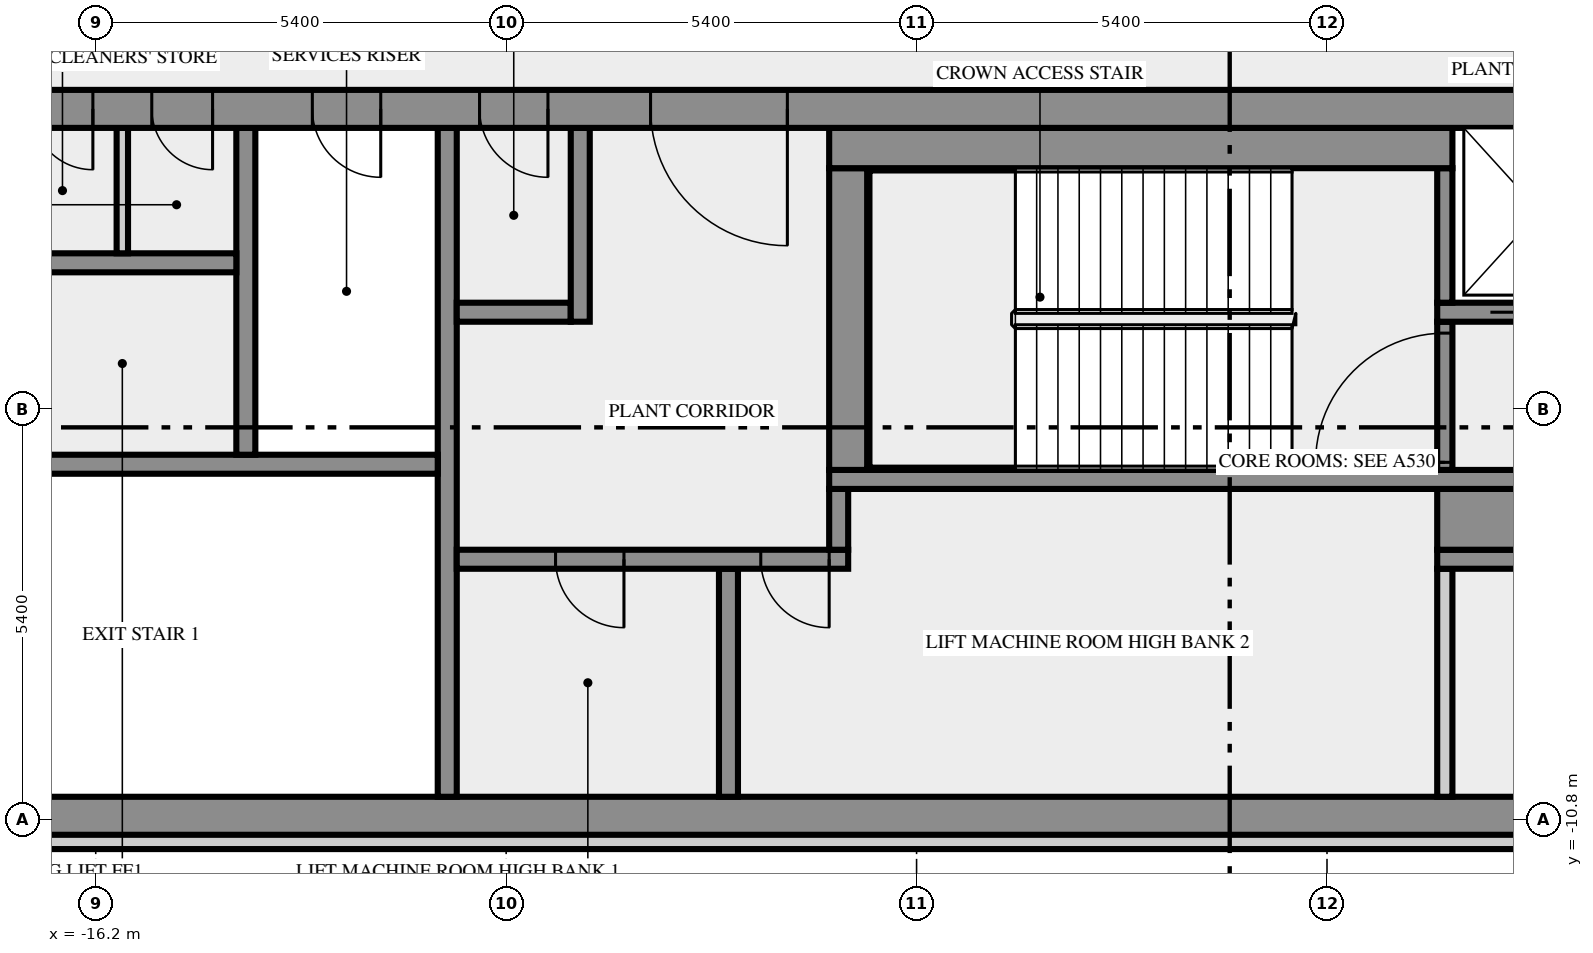
"""IFC4 building model, lengths in metres.
Left out: names, types, materials, properties, quantities, classifications, styles, units other than length and angle.
Written with IfcOpenShell. Run it as: python <this file> out.ifc"""

import sys

from ifc_helpers import new_model, si_unit, direction, frame, frame_2d, origin, place, context, subcontext, project, spatial, rectangle, extrude, element, fill, save


model = new_model("IFC4")
c1 = context("Model", 3, precision=1e-05, world=origin(), true_north=direction((0.0, 1.0)))
c2 = subcontext(c1, "Body", "Model", "MODEL_VIEW")
j1 = project(units=[si_unit("LENGTHUNIT", "METRE"), si_unit("PLANEANGLEUNIT", "RADIAN")], contexts=[c1])
p1 = place(None, origin())
s1 = spatial("IfcSite", under=j1, at=p1, CompositionType="ELEMENT")
p2 = place(p1, origin())
s2 = spatial("IfcBuilding", under=s1, at=p2, CompositionType="ELEMENT")
p3 = place(p2, frame((0.0, 0.0, 363.0)))
s3 = spatial("IfcBuildingStorey", under=s2, at=p3, CompositionType="ELEMENT", Elevation=363.0)
p4 = place(p3, frame((-14.748, 10.692, 0.0), z_axis=(0.0, 0.0, 1.0), x_axis=(-0.453989383659, -0.891007092859, 0.0)))
e1 = element("IfcWall", 1, at=p4, inside=s3, PredefinedType="SOLIDWALL", context=c2, shape_type="SweptSolid", body=[
    extrude(rectangle(XDim=20.988, YDim=0.2, at=frame_2d((10.494, 0.0))), origin(), (0.0, 0.0, 1.0), 4.75),
])
p5 = place(p4, frame((1.06, 0.0, 1.0)))
e2 = element("IfcOpeningElement", 2, at=p5, cuts=e1, PredefinedType="OPENING", context=c2, shape_type="SweptSolid", body=[
    extrude(rectangle(XDim=3.0, YDim=2.8, at=frame_2d((1.5, 1.4))), frame((0.0, 0.11, 0.0), z_axis=(0.0, -1.0, 0.0), x_axis=(1.0, 0.0, 0.0)), (0.0, 0.0, 1.0), 0.22),
])
p6 = place(p4, frame((6.428, 0.0, 1.0)))
e3 = element("IfcOpeningElement", 3, at=p6, cuts=e1, PredefinedType="OPENING", context=c2, shape_type="SweptSolid", body=[
    extrude(rectangle(XDim=3.0, YDim=2.8, at=frame_2d((1.5, 1.4))), frame((0.0, 0.11, 0.0), z_axis=(0.0, -1.0, 0.0), x_axis=(1.0, 0.0, 0.0)), (0.0, 0.0, 1.0), 0.22),
])
p7 = place(p4, frame((12.044, 0.0, 1.0)))
e4 = element("IfcOpeningElement", 4, at=p7, cuts=e1, PredefinedType="OPENING", context=c2, shape_type="SweptSolid", body=[
    extrude(rectangle(XDim=3.0, YDim=2.8, at=frame_2d((1.5, 1.4))), frame((0.0, 0.11, 0.0), z_axis=(0.0, -1.0, 0.0), x_axis=(1.0, 0.0, 0.0)), (0.0, 0.0, 1.0), 0.22),
])
p8 = place(p4, frame((17.17, 0.0, 1.0)))
e5 = element("IfcOpeningElement", 5, at=p8, cuts=e1, PredefinedType="OPENING", context=c2, shape_type="SweptSolid", body=[
    extrude(rectangle(XDim=3.0, YDim=2.8, at=frame_2d((1.5, 1.4))), frame((0.0, 0.11, 0.0), z_axis=(0.0, -1.0, 0.0), x_axis=(1.0, 0.0, 0.0)), (0.0, 0.0, 1.0), 0.22),
])
p9 = place(p3, frame((-17.444, -11.088, 0.0), z_axis=(0.0, 0.0, 1.0), x_axis=(1.0, 0.0, 0.0)))
e6 = element("IfcWall", 6, at=p9, inside=s3, PredefinedType="SOLIDWALL", context=c2, shape_type="SweptSolid", body=[
    extrude(rectangle(XDim=34.888, YDim=0.2, at=frame_2d((17.444, 0.0))), origin(), (0.0, 0.0, 1.0), 4.75),
])
p10 = place(p3, frame((-20.0, -10.75, 0.0), z_axis=(0.0, 0.0, 1.0), x_axis=(1.0, 0.0, 0.0)))
e7 = element("IfcWall", 7, at=p10, inside=s3, PredefinedType="SHEAR", context=c2, shape_type="SweptSolid", body=[
    extrude(rectangle(XDim=40.0, YDim=0.5, at=frame_2d((20.0, 0.0))), origin(), (0.0, 0.0, 1.0), 4.75),
])
p11 = place(p10, frame((0.8, 0.0, 1.0)))
e8 = element("IfcOpeningElement", 8, at=p11, cuts=e7, PredefinedType="OPENING", context=c2, shape_type="SweptSolid", body=[
    extrude(rectangle(XDim=1.2, YDim=1.2, at=frame_2d((0.6, 0.6))), frame((0.0, 0.26, 0.0), z_axis=(0.0, -1.0, 0.0), x_axis=(1.0, 0.0, 0.0)), (0.0, 0.0, 1.0), 0.52),
])
p12 = place(p10, frame((38.0, 0.0, 1.0)))
e9 = element("IfcOpeningElement", 9, at=p12, cuts=e7, PredefinedType="OPENING", context=c2, shape_type="SweptSolid", body=[
    extrude(rectangle(XDim=1.2, YDim=1.2, at=frame_2d((0.6, 0.6))), frame((0.0, 0.26, 0.0), z_axis=(0.0, -1.0, 0.0), x_axis=(1.0, 0.0, 0.0)), (0.0, 0.0, 1.0), 0.52),
])
p13 = place(p3, frame((-11.575, -10.5, 0.0), z_axis=(0.0, 0.0, 1.0), x_axis=(0.0, 1.0, 0.0)))
e10 = element("IfcWall", 10, at=p13, inside=s3, PredefinedType="SHEAR", context=c2, shape_type="SweptSolid", body=[
    extrude(rectangle(XDim=8.8, YDim=0.25, at=frame_2d((4.4, 0.0))), origin(), (0.0, 0.0, 1.0), 4.75),
])
p14 = place(p3, frame((-7.875, -10.5, 0.0), z_axis=(0.0, 0.0, 1.0), x_axis=(0.0, 1.0, 0.0)))
e11 = element("IfcWall", 11, at=p14, inside=s3, PredefinedType="SHEAR", context=c2, shape_type="SweptSolid", body=[
    extrude(rectangle(XDim=3.0, YDim=0.25, at=frame_2d((1.5, 0.0))), origin(), (0.0, 0.0, 1.0), 4.75),
])
p15 = place(p3, frame((1.55, -10.5, 0.0), z_axis=(0.0, 0.0, 1.0), x_axis=(0.0, 1.0, 0.0)))
e12 = element("IfcWall", 12, at=p15, inside=s3, PredefinedType="SOLIDWALL", context=c2, shape_type="SweptSolid", body=[
    extrude(rectangle(XDim=3.0, YDim=0.2, at=frame_2d((1.5, 0.0))), origin(), (0.0, 0.0, 1.0), 4.75),
])
p16 = place(p3, frame((-6.3, -7.375, 0.0), z_axis=(0.0, 0.0, 1.0), x_axis=(-1.0, 0.0, 0.0)))
e13 = element("IfcWall", 13, at=p16, inside=s3, PredefinedType="SHEAR", context=c2, shape_type="SweptSolid", body=[
    extrude(rectangle(XDim=5.15, YDim=0.25, at=frame_2d((2.575, 0.0))), origin(), (0.0, 0.0, 1.0), 4.75),
])
p17 = place(p16, frame((2.95, 0.0, 0.0)))
e14 = element("IfcOpeningElement", 14, at=p17, cuts=e13, PredefinedType="OPENING", context=c2, shape_type="SweptSolid", body=[
    extrude(rectangle(XDim=0.9, YDim=2.1, at=frame_2d((0.45, 1.05))), frame((0.0, 0.135, 0.0), z_axis=(0.0, -1.0, 0.0), x_axis=(1.0, 0.0, 0.0)), (0.0, 0.0, 1.0), 0.27),
])
p18 = place(p16, frame((0.25, 0.0, 0.0)))
e15 = element("IfcOpeningElement", 15, at=p18, cuts=e13, PredefinedType="OPENING", context=c2, shape_type="SweptSolid", body=[
    extrude(rectangle(XDim=0.9, YDim=2.1, at=frame_2d((0.45, 1.05))), frame((0.0, 0.135, 0.0), z_axis=(0.0, -1.0, 0.0), x_axis=(1.0, 0.0, 0.0)), (0.0, 0.0, 1.0), 0.27),
])
p19 = place(p3, frame((11.7, -7.375, 0.0), z_axis=(0.0, 0.0, 1.0), x_axis=(-1.0, 0.0, 0.0)))
e16 = element("IfcWall", 16, at=p19, inside=s3, PredefinedType="SHEAR", context=c2, shape_type="SweptSolid", body=[
    extrude(rectangle(XDim=10.25, YDim=0.25, at=frame_2d((5.125, 0.0))), origin(), (0.0, 0.0, 1.0), 4.75),
])
p20 = place(p19, frame((3.25, 0.0, 0.0)))
e17 = element("IfcOpeningElement", 17, at=p20, cuts=e16, PredefinedType="OPENING", context=c2, shape_type="SweptSolid", body=[
    extrude(rectangle(XDim=0.9, YDim=2.1, at=frame_2d((0.45, 1.05))), frame((0.0, 0.135, 0.0), z_axis=(0.0, -1.0, 0.0), x_axis=(1.0, 0.0, 0.0)), (0.0, 0.0, 1.0), 0.27),
])
p21 = place(p3, frame((-6.425, -7.25, 0.0), z_axis=(0.0, 0.0, 1.0), x_axis=(0.0, 1.0, 0.0)))
e18 = element("IfcWall", 18, at=p21, inside=s3, PredefinedType="SHEAR", context=c2, shape_type="SweptSolid", body=[
    extrude(rectangle(XDim=0.8, YDim=0.25, at=frame_2d((0.4, 0.0))), origin(), (0.0, 0.0, 1.0), 4.75),
])
p22 = place(p3, frame((1.45, -6.85, 0.0), z_axis=(0.0, 0.0, 1.0), x_axis=(1.0, 0.0, 0.0)))
e19 = element("IfcWall", 19, at=p22, inside=s3, PredefinedType="SHEAR", context=c2, shape_type="SweptSolid", body=[
    extrude(rectangle(XDim=2.75, YDim=0.8, at=frame_2d((1.375, 0.0))), origin(), (0.0, 0.0, 1.0), 4.75),
])
p23 = place(p3, frame((-6.55, -6.325, 0.0), z_axis=(0.0, 0.0, 1.0), x_axis=(1.0, 0.0, 0.0)))
e20 = element("IfcWall", 20, at=p23, inside=s3, PredefinedType="SHEAR", context=c2, shape_type="SweptSolid", body=[
    extrude(rectangle(XDim=10.75, YDim=0.25, at=frame_2d((5.375, 0.0))), origin(), (0.0, 0.0, 1.0), 4.75),
])
p24 = place(p3, frame((-11.7, -6.125, 0.0), z_axis=(0.0, 0.0, 1.0), x_axis=(-1.0, 0.0, 0.0)))
e21 = element("IfcWall", 21, at=p24, inside=s3, PredefinedType="SHEAR", context=c2, shape_type="SweptSolid", body=[
    extrude(rectangle(XDim=7.8, YDim=0.25, at=frame_2d((3.9, 0.0))), origin(), (0.0, 0.0, 1.0), 4.75),
])
p25 = place(p24, frame((5.95, 0.0, 0.0)))
e22 = element("IfcOpeningElement", 22, at=p25, cuts=e21, PredefinedType="OPENING", context=c2, shape_type="SweptSolid", body=[
    extrude(rectangle(XDim=1.8, YDim=2.1, at=frame_2d((0.9, 1.05))), frame((0.0, 0.135, 0.0), z_axis=(0.0, -1.0, 0.0), x_axis=(1.0, 0.0, 0.0)), (0.0, 0.0, 1.0), 0.27),
])
p26 = place(p3, frame((-6.3, -6.2, 0.0), z_axis=(0.0, 0.0, 1.0), x_axis=(0.0, 1.0, 0.0)))
e23 = element("IfcWall", 23, at=p26, inside=s3, PredefinedType="SHEAR", context=c2, shape_type="SweptSolid", body=[
    extrude(rectangle(XDim=3.97, YDim=0.5, at=frame_2d((1.985, 0.0))), origin(), (0.0, 0.0, 1.0), 4.75),
])
p27 = place(p3, frame((1.55, -6.2, 0.0), z_axis=(0.0, 0.0, 1.0), x_axis=(0.0, 1.0, 0.0)))
e24 = element("IfcWall", 24, at=p27, inside=s3, PredefinedType="SHEAR", context=c2, shape_type="SweptSolid", body=[
    extrude(rectangle(XDim=1.95, YDim=0.2, at=frame_2d((0.975, 0.0))), origin(), (0.0, 0.0, 1.0), 4.75),
])
p28 = place(p27, frame((0.1, 0.0, 0.0)))
e25 = element("IfcOpeningElement", 25, at=p28, cuts=e24, PredefinedType="OPENING", context=c2, shape_type="SweptSolid", body=[
    extrude(rectangle(XDim=1.7, YDim=2.1, at=frame_2d((0.85, 1.05))), frame((0.0, 0.11, 0.0), z_axis=(0.0, -1.0, 0.0), x_axis=(1.0, 0.0, 0.0)), (0.0, 0.0, 1.0), 0.22),
])
p29 = place(p3, frame((-14.225, -6.0, 0.0), z_axis=(0.0, 0.0, 1.0), x_axis=(0.0, 1.0, 0.0)))
e26 = element("IfcWall", 26, at=p29, inside=s3, PredefinedType="SHEAR", context=c2, shape_type="SweptSolid", body=[
    extrude(rectangle(XDim=4.3, YDim=0.25, at=frame_2d((2.15, 0.0))), origin(), (0.0, 0.0, 1.0), 4.75),
])
p30 = place(p3, frame((-11.45, -4.125, 0.0), z_axis=(0.0, 0.0, 1.0), x_axis=(1.0, 0.0, 0.0)))
e27 = element("IfcWall", 27, at=p30, inside=s3, PredefinedType="SHEAR", context=c2, shape_type="SweptSolid", body=[
    extrude(rectangle(XDim=1.5, YDim=0.25, at=frame_2d((0.75, 0.0))), origin(), (0.0, 0.0, 1.0), 4.75),
])
p31 = place(p3, frame((-9.825, -4.25, 0.0), z_axis=(0.0, 0.0, 1.0), x_axis=(0.0, 1.0, 0.0)))
e28 = element("IfcWall", 28, at=p31, inside=s3, PredefinedType="SHEAR", context=c2, shape_type="SweptSolid", body=[
    extrude(rectangle(XDim=2.55, YDim=0.25, at=frame_2d((1.275, 0.0))), origin(), (0.0, 0.0, 1.0), 4.75),
])
p32 = place(p3, frame((1.45, -4.125, 0.0), z_axis=(0.0, 0.0, 1.0), x_axis=(1.0, 0.0, 0.0)))
e29 = element("IfcWall", 29, at=p32, inside=s3, PredefinedType="SHEAR", context=c2, shape_type="SweptSolid", body=[
    extrude(rectangle(XDim=6.55, YDim=0.25, at=frame_2d((3.275, 0.0))), origin(), (0.0, 0.0, 1.0), 4.75),
])
p33 = place(p32, frame((0.7, 0.0, 0.0)))
e30 = element("IfcOpeningElement", 30, at=p33, cuts=e29, PredefinedType="OPENING", context=c2, shape_type="SweptSolid", body=[
    extrude(rectangle(XDim=1.3, YDim=2.1, at=frame_2d((0.65, 1.05))), frame((0.0, 0.135, 0.0), z_axis=(0.0, -1.0, 0.0), x_axis=(1.0, 0.0, 0.0)), (0.0, 0.0, 1.0), 0.27),
])
p34 = place(p3, frame((1.55, -4.0, 0.0), z_axis=(0.0, 0.0, 1.0), x_axis=(0.0, 1.0, 0.0)))
e31 = element("IfcWall", 31, at=p34, inside=s3, PredefinedType="SHEAR", context=c2, shape_type="SweptSolid", body=[
    extrude(rectangle(XDim=1.77, YDim=0.2, at=frame_2d((0.885, 0.0))), origin(), (0.0, 0.0, 1.0), 4.75),
])
p35 = place(p3, frame((-17.35, -3.475, 0.0), z_axis=(0.0, 0.0, 1.0), x_axis=(1.0, 0.0, 0.0)))
e32 = element("IfcWall", 32, at=p35, inside=s3, PredefinedType="SHEAR", context=c2, shape_type="SweptSolid", body=[
    extrude(rectangle(XDim=3.0, YDim=0.25, at=frame_2d((1.5, 0.0))), origin(), (0.0, 0.0, 1.0), 4.75),
])
p36 = place(p3, frame((-15.85, -3.35, 0.0), z_axis=(0.0, 0.0, 1.0), x_axis=(0.0, 1.0, 0.0)))
e33 = element("IfcWall", 33, at=p36, inside=s3, PredefinedType="PARTITIONING", context=c2, shape_type="SweptSolid", body=[
    extrude(rectangle(XDim=1.65, YDim=0.15, at=frame_2d((0.825, 0.0))), origin(), (0.0, 0.0, 1.0), 4.75),
])
p37 = place(p3, frame((-6.55, -1.965, 0.0), z_axis=(0.0, 0.0, 1.0), x_axis=(1.0, 0.0, 0.0)))
e34 = element("IfcWall", 34, at=p37, inside=s3, PredefinedType="SHEAR", context=c2, shape_type="SweptSolid", body=[
    extrude(rectangle(XDim=8.2, YDim=0.53, at=frame_2d((4.1, 0.0))), origin(), (0.0, 0.0, 1.0), 4.75),
])
p38 = place(p3, frame((20.0, -1.45, 0.0), z_axis=(0.0, 0.0, 1.0), x_axis=(-1.0, 0.0, 0.0)))
e35 = element("IfcWall", 35, at=p38, inside=s3, PredefinedType="SHEAR", context=c2, shape_type="SweptSolid", body=[
    extrude(rectangle(XDim=40.0, YDim=0.5, at=frame_2d((20.0, 0.0))), origin(), (0.0, 0.0, 1.0), 4.75),
])
p39 = place(p38, frame((37.65, 0.0, 0.0)))
e36 = element("IfcOpeningElement", 36, at=p39, cuts=e35, PredefinedType="OPENING", context=c2, shape_type="SweptSolid", body=[
    extrude(rectangle(XDim=1.8, YDim=2.1, at=frame_2d((0.9, 1.05))), frame((0.0, 0.26, 0.0), z_axis=(0.0, -1.0, 0.0), x_axis=(1.0, 0.0, 0.0)), (0.0, 0.0, 1.0), 0.52),
])
p40 = place(p38, frame((36.238, 0.0, 0.0)))
e37 = element("IfcOpeningElement", 37, at=p40, cuts=e35, PredefinedType="OPENING", context=c2, shape_type="SweptSolid", body=[
    extrude(rectangle(XDim=0.8, YDim=2.1, at=frame_2d((0.4, 1.05))), frame((0.0, 0.26, 0.0), z_axis=(0.0, -1.0, 0.0), x_axis=(1.0, 0.0, 0.0)), (0.0, 0.0, 1.0), 0.52),
])
p41 = place(p38, frame((34.663, 0.0, 0.0)))
e38 = element("IfcOpeningElement", 38, at=p41, cuts=e35, PredefinedType="OPENING", context=c2, shape_type="SweptSolid", body=[
    extrude(rectangle(XDim=0.8, YDim=2.1, at=frame_2d((0.4, 1.05))), frame((0.0, 0.26, 0.0), z_axis=(0.0, -1.0, 0.0), x_axis=(1.0, 0.0, 0.0)), (0.0, 0.0, 1.0), 0.52),
])
p42 = place(p38, frame((32.45, 0.0, 0.0)))
e39 = element("IfcOpeningElement", 39, at=p42, cuts=e35, PredefinedType="OPENING", context=c2, shape_type="SweptSolid", body=[
    extrude(rectangle(XDim=0.9, YDim=2.1, at=frame_2d((0.45, 1.05))), frame((0.0, 0.26, 0.0), z_axis=(0.0, -1.0, 0.0), x_axis=(1.0, 0.0, 0.0)), (0.0, 0.0, 1.0), 0.52),
])
p43 = place(p38, frame((30.25, 0.0, 0.0)))
e40 = element("IfcOpeningElement", 40, at=p43, cuts=e35, PredefinedType="OPENING", context=c2, shape_type="SweptSolid", body=[
    extrude(rectangle(XDim=0.9, YDim=2.1, at=frame_2d((0.45, 1.05))), frame((0.0, 0.26, 0.0), z_axis=(0.0, -1.0, 0.0), x_axis=(1.0, 0.0, 0.0)), (0.0, 0.0, 1.0), 0.52),
])
p44 = place(p38, frame((27.1, 0.0, 0.0)))
e41 = element("IfcOpeningElement", 41, at=p44, cuts=e35, PredefinedType="OPENING", context=c2, shape_type="SweptSolid", body=[
    extrude(rectangle(XDim=1.8, YDim=2.1, at=frame_2d((0.9, 1.05))), frame((0.0, 0.26, 0.0), z_axis=(0.0, -1.0, 0.0), x_axis=(1.0, 0.0, 0.0)), (0.0, 0.0, 1.0), 0.52),
])
p45 = place(p38, frame((13.5, 0.0, 0.0)))
e42 = element("IfcOpeningElement", 42, at=p45, cuts=e35, PredefinedType="OPENING", context=c2, shape_type="SweptSolid", body=[
    extrude(rectangle(XDim=0.9, YDim=2.1, at=frame_2d((0.45, 1.05))), frame((0.0, 0.26, 0.0), z_axis=(0.0, -1.0, 0.0), x_axis=(1.0, 0.0, 0.0)), (0.0, 0.0, 1.0), 0.52),
])
p46 = place(p38, frame((9.275, 0.0, 0.0)))
e43 = element("IfcOpeningElement", 43, at=p46, cuts=e35, PredefinedType="OPENING", context=c2, shape_type="SweptSolid", body=[
    extrude(rectangle(XDim=2.0, YDim=2.1, at=frame_2d((1.0, 1.05))), frame((0.0, 0.26, 0.0), z_axis=(0.0, -1.0, 0.0), x_axis=(1.0, 0.0, 0.0)), (0.0, 0.0, 1.0), 0.52),
])
p47 = place(p38, frame((6.65, 0.0, 0.0)))
e44 = element("IfcOpeningElement", 44, at=p47, cuts=e35, PredefinedType="OPENING", context=c2, shape_type="SweptSolid", body=[
    extrude(rectangle(XDim=0.9, YDim=2.1, at=frame_2d((0.45, 1.05))), frame((0.0, 0.26, 0.0), z_axis=(0.0, -1.0, 0.0), x_axis=(1.0, 0.0, 0.0)), (0.0, 0.0, 1.0), 0.52),
])
p48 = place(p38, frame((3.7, 0.0, 0.0)))
e45 = element("IfcOpeningElement", 45, at=p48, cuts=e35, PredefinedType="OPENING", context=c2, shape_type="SweptSolid", body=[
    extrude(rectangle(XDim=0.9, YDim=2.1, at=frame_2d((0.45, 1.05))), frame((0.0, 0.26, 0.0), z_axis=(0.0, -1.0, 0.0), x_axis=(1.0, 0.0, 0.0)), (0.0, 0.0, 1.0), 0.52),
])
p49 = place(p38, frame((0.55, 0.0, 0.0)))
e46 = element("IfcOpeningElement", 46, at=p49, cuts=e35, PredefinedType="OPENING", context=c2, shape_type="SweptSolid", body=[
    extrude(rectangle(XDim=1.8, YDim=2.1, at=frame_2d((0.9, 1.05))), frame((0.0, 0.26, 0.0), z_axis=(0.0, -1.0, 0.0), x_axis=(1.0, 0.0, 0.0)), (0.0, 0.0, 1.0), 0.52),
])
p50 = place(p17, origin())
e47 = element("IfcDoor", 47, at=p50, inside=s3, OperationType="SINGLE_SWING_RIGHT", PredefinedType="DOOR", context=c2, shape_type="SweptSolid", body=[
    extrude(rectangle(XDim=0.9, YDim=2.1, at=frame_2d((0.45, 1.05))), frame((0.0, 0.025, 0.0), z_axis=(0.0, -1.0, 0.0), x_axis=(1.0, 0.0, 0.0)), (0.0, 0.0, 1.0), 0.05),
])
fill(e14, e47)
p51 = place(p18, origin())
e48 = element("IfcDoor", 48, at=p51, inside=s3, OperationType="SINGLE_SWING_LEFT", PredefinedType="DOOR", context=c2, shape_type="SweptSolid", body=[
    extrude(rectangle(XDim=0.9, YDim=2.1, at=frame_2d((0.45, 1.05))), frame((0.0, 0.025, 0.0), z_axis=(0.0, -1.0, 0.0), x_axis=(1.0, 0.0, 0.0)), (0.0, 0.0, 1.0), 0.05),
])
fill(e15, e48)
p52 = place(p28, origin())
e49 = element("IfcDoor", 49, at=p52, inside=s3, OperationType="DOUBLE_DOOR_SINGLE_SWING", PredefinedType="DOOR", context=c2, shape_type="SweptSolid", body=[
    extrude(rectangle(XDim=1.7, YDim=2.1, at=frame_2d((0.85, 1.05))), frame((0.0, 0.025, 0.0), z_axis=(0.0, -1.0, 0.0), x_axis=(1.0, 0.0, 0.0)), (0.0, 0.0, 1.0), 0.05),
])
fill(e25, e49)
p53 = place(p33, origin())
e50 = element("IfcDoor", 50, at=p53, inside=s3, OperationType="DOUBLE_DOOR_SLIDING", PredefinedType="DOOR", context=c2, shape_type="SweptSolid", body=[
    extrude(rectangle(XDim=1.3, YDim=2.1, at=frame_2d((0.65, 1.05))), frame((0.0, 0.025, 0.0), z_axis=(0.0, -1.0, 0.0), x_axis=(1.0, 0.0, 0.0)), (0.0, 0.0, 1.0), 0.05),
])
fill(e30, e50)
p54 = place(p40, origin())
e51 = element("IfcDoor", 51, at=p54, inside=s3, OperationType="SINGLE_SWING_RIGHT", PredefinedType="DOOR", context=c2, shape_type="SweptSolid", body=[
    extrude(rectangle(XDim=0.8, YDim=2.1, at=frame_2d((0.4, 1.05))), frame((0.0, 0.025, 0.0), z_axis=(0.0, -1.0, 0.0), x_axis=(1.0, 0.0, 0.0)), (0.0, 0.0, 1.0), 0.05),
])
fill(e37, e51)
p55 = place(p41, origin())
e52 = element("IfcDoor", 52, at=p55, inside=s3, OperationType="SINGLE_SWING_RIGHT", PredefinedType="DOOR", context=c2, shape_type="SweptSolid", body=[
    extrude(rectangle(XDim=0.8, YDim=2.1, at=frame_2d((0.4, 1.05))), frame((0.0, 0.025, 0.0), z_axis=(0.0, -1.0, 0.0), x_axis=(1.0, 0.0, 0.0)), (0.0, 0.0, 1.0), 0.05),
])
fill(e38, e52)
p56 = place(p42, origin())
e53 = element("IfcDoor", 53, at=p56, inside=s3, OperationType="SINGLE_SWING_RIGHT", PredefinedType="DOOR", context=c2, shape_type="SweptSolid", body=[
    extrude(rectangle(XDim=0.9, YDim=2.1, at=frame_2d((0.45, 1.05))), frame((0.0, 0.025, 0.0), z_axis=(0.0, -1.0, 0.0), x_axis=(1.0, 0.0, 0.0)), (0.0, 0.0, 1.0), 0.05),
])
fill(e39, e53)
p57 = place(p43, origin())
e54 = element("IfcDoor", 54, at=p57, inside=s3, OperationType="SINGLE_SWING_RIGHT", PredefinedType="DOOR", context=c2, shape_type="SweptSolid", body=[
    extrude(rectangle(XDim=0.9, YDim=2.1, at=frame_2d((0.45, 1.05))), frame((0.0, 0.025, 0.0), z_axis=(0.0, -1.0, 0.0), x_axis=(1.0, 0.0, 0.0)), (0.0, 0.0, 1.0), 0.05),
])
fill(e40, e54)
p58 = place(p44, origin())
e55 = element("IfcDoor", 55, at=p58, inside=s3, OperationType="DOUBLE_DOOR_SINGLE_SWING", PredefinedType="DOOR", context=c2, shape_type="SweptSolid", body=[
    extrude(rectangle(XDim=1.8, YDim=2.1, at=frame_2d((0.9, 1.05))), frame((0.0, 0.025, 0.0), z_axis=(0.0, -1.0, 0.0), x_axis=(1.0, 0.0, 0.0)), (0.0, 0.0, 1.0), 0.05),
])
fill(e41, e55)
save(model, sys.argv[1])
